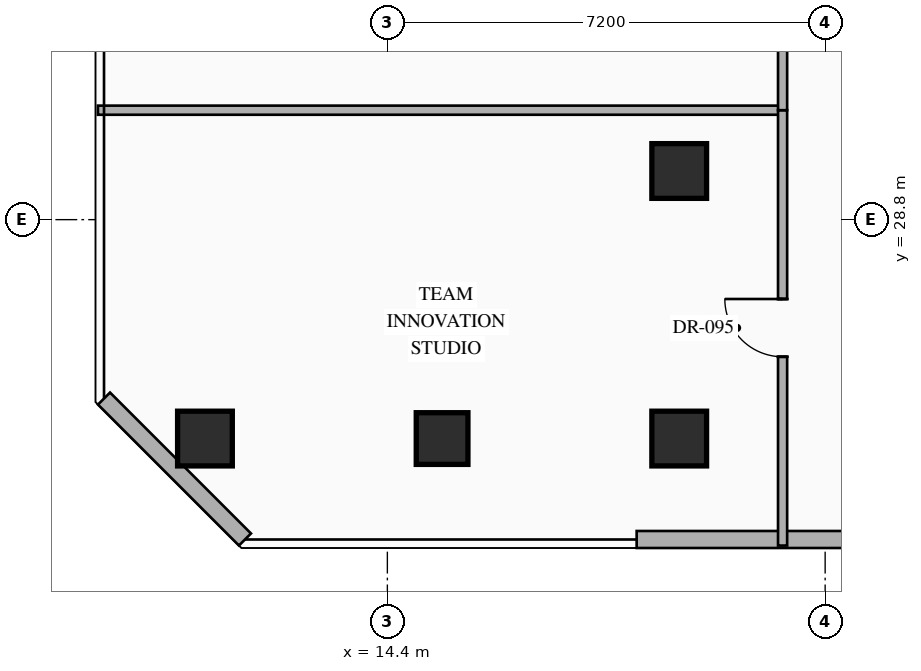
"""IFC4 building model, lengths in metres.
Left out: names, types, materials, properties, quantities, classifications, styles, units other than length and angle.
Written with IfcOpenShell. Run it as: python <this file> out.ifc"""

import sys

from ifc_helpers import new_model, si_unit, direction, frame, frame_2d, origin, origin_2d, place, context, subcontext, project, spatial, rectangle, hollow_rectangle, extrude, element, fill, save


model = new_model("IFC4")
c1 = context("Model", 3, precision=1e-05, world=origin(), true_north=direction((0.0, 1.0)))
c2 = subcontext(c1, "Body", "Model", "MODEL_VIEW")
j1 = project(units=[si_unit("LENGTHUNIT", "METRE"), si_unit("PLANEANGLEUNIT", "RADIAN")], contexts=[c1])
p1 = place(None, origin())
s1 = spatial("IfcSite", under=j1, at=p1, CompositionType="ELEMENT")
p2 = place(p1, origin())
s2 = spatial("IfcBuilding", under=s1, at=p2, CompositionType="ELEMENT")
p3 = place(p2, frame((0.0, 0.0, 101.25)))
s3 = spatial("IfcBuildingStorey", under=s2, at=p3, CompositionType="ELEMENT", Elevation=101.25)
for number, where, z_axis, x_axis in (
    (1, (11.4, 25.2, 0.0), (0.0, 0.0, 1.0), (1.0, 0.0, 0.0)),
    (2, (19.2, 25.2, 0.0), (0.0, 0.0, 1.0), (1.0, 0.0, 0.0)),
    (3, (19.2, 29.6, 0.0), (0.0, 0.0, 1.0), (1.0, 0.0, 0.0)),
):
    element("IfcColumn", number, at=place(p3, frame(where, z_axis=z_axis, x_axis=x_axis)), inside=s3, PredefinedType="COLUMN", context=c2, shape_type="SweptSolid", body=[
        extrude(hollow_rectangle(XDim=0.9, YDim=0.9, WallThickness=0.036, at=origin_2d()), origin(), (0.0, 0.0, 1.0), 3.6),
    ])
p4 = place(p3, frame((15.3, 25.2, 0.0), z_axis=(0.0, 0.0, 1.0), x_axis=(1.0, 0.0, 0.0)))
e4 = element("IfcColumn", 4, at=p4, inside=s3, PredefinedType="COLUMN", context=c2, shape_type="SweptSolid", body=[
    extrude(hollow_rectangle(XDim=0.85, YDim=0.85, WallThickness=0.032, at=origin_2d()), origin(), (0.0, 0.0, 1.0), 3.6),
])
p5 = place(p3, frame((25.247, 23.54, 0.0), z_axis=(0.0, 0.0, 1.0), x_axis=(-1.0, 0.0, 0.0)))
e5 = element("IfcWall", 5, at=p5, inside=s3, PredefinedType="STANDARD", context=c2, shape_type="SweptSolid", body=[
    extrude(rectangle(XDim=6.747, YDim=0.28, at=frame_2d((3.374, 0.0))), origin(), (0.0, 0.0, 1.0), 3.35),
])
p6 = place(p3, frame((12.058, 23.54, 0.0), z_axis=(0.0, 0.0, 1.0), x_axis=(-0.707144017911, 0.707069542501, 0.0)))
e6 = element("IfcWall", 6, at=p6, inside=s3, PredefinedType="STANDARD", context=c2, shape_type="SweptSolid", body=[
    extrude(rectangle(XDim=3.278, YDim=0.28, at=frame_2d((1.639, 0.0))), origin(), (0.0, 0.0, 1.0), 3.35),
])
p7 = place(p3, frame((9.64, 30.6, 0.0), z_axis=(0.0, 0.0, 1.0), x_axis=(1.0, 0.0, 0.0)))
e7 = element("IfcWall", 7, at=p7, inside=s3, PredefinedType="PARTITIONING", context=c2, shape_type="SweptSolid", body=[
    extrude(rectangle(XDim=11.26, YDim=0.15, at=frame_2d((5.63, 0.0))), origin(), (0.0, 0.0, 1.0), 3.35),
])
p8 = place(p3, frame((20.9, 23.44, 0.0), z_axis=(0.0, 0.0, 1.0), x_axis=(0.0, 1.0, 0.0)))
e8 = element("IfcWall", 8, at=p8, inside=s3, PredefinedType="PARTITIONING", context=c2, shape_type="SweptSolid", body=[
    extrude(rectangle(XDim=7.16, YDim=0.15, at=frame_2d((3.58, 0.0))), origin(), (0.0, 0.0, 1.0), 3.35),
])
p9 = place(p8, frame((3.105, 0.0, 0.0)))
e9 = element("IfcOpeningElement", 9, at=p9, cuts=e8, PredefinedType="OPENING", context=c2, shape_type="SweptSolid", body=[
    extrude(rectangle(XDim=0.95, YDim=2.15, at=frame_2d((0.475, 1.075))), frame((0.0, 0.085, 0.0), z_axis=(0.0, -1.0, 0.0), x_axis=(1.0, 0.0, 0.0)), (0.0, 0.0, 1.0), 0.17),
])
p10 = place(p3, frame((20.9, 30.6, 0.0), z_axis=(0.0, 0.0, 1.0), x_axis=(0.0, 1.0, 0.0)))
e10 = element("IfcWall", 10, at=p10, inside=s3, PredefinedType="PARTITIONING", context=c2, shape_type="SweptSolid", body=[
    extrude(rectangle(XDim=9.6, YDim=0.15, at=frame_2d((4.8, 0.0))), origin(), (0.0, 0.0, 1.0), 3.35),
])
p11 = place(p10, frame((1.169, 0.0, 0.0)))
e11 = element("IfcOpeningElement", 11, at=p11, cuts=e10, PredefinedType="OPENING", context=c2, shape_type="SweptSolid", body=[
    extrude(rectangle(XDim=0.95, YDim=2.15, at=frame_2d((0.475, 1.075))), frame((0.0, 0.085, 0.0), z_axis=(0.0, -1.0, 0.0), x_axis=(1.0, 0.0, 0.0)), (0.0, 0.0, 1.0), 0.17),
])
p12 = place(p9, origin())
e12 = element("IfcDoor", 12, at=p12, inside=s3, OperationType="SINGLE_SWING_RIGHT", PredefinedType="DOOR", context=c2, shape_type="SweptSolid", body=[
    extrude(rectangle(XDim=0.95, YDim=2.15, at=frame_2d((0.475, 1.075))), frame((0.0, 0.025, 0.0), z_axis=(0.0, -1.0, 0.0), x_axis=(1.0, 0.0, 0.0)), (0.0, 0.0, 1.0), 0.05),
])
fill(e9, e12)
save(model, sys.argv[1])
